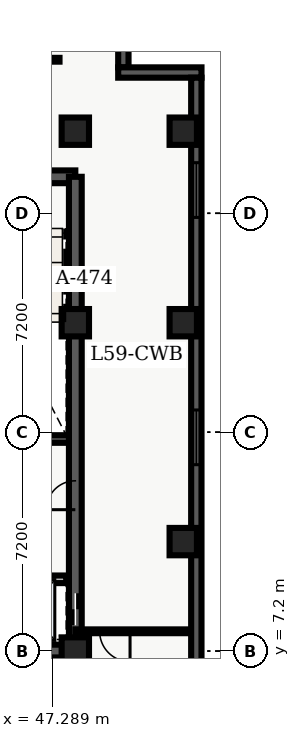
"""IFC4 building model, lengths in metres.
Left out: names, types, materials, properties, quantities, classifications, styles, units other than length and angle.
Written with IfcOpenShell. Run it as: python <this file> out.ifc"""

import sys

from ifc_helpers import new_model, entity, si_unit, converted_unit, direction, frame, origin_with_axes, origin_2d_with_axis, place, context, subcontext, project, spatial, polyline, rectangle, outline, extrude, element, fill, save


model = new_model("IFC4")
c1 = context("Model", 3, precision=1e-05, world=origin_with_axes(), true_north=direction((0.0, 1.0)))
c2 = subcontext(c1, "Body", "Model", "MODEL_VIEW")
j1 = project(units=[si_unit("LENGTHUNIT", "METRE"), converted_unit("PLANEANGLEUNIT", "DEGREE", entity("IfcPlaneAngleMeasure", 0.017), si_unit("PLANEANGLEUNIT", "RADIAN"), dimensions=[0, 0, 0, 0, 0, 0, 0])], contexts=[c1])
p1 = place(None, origin_with_axes())
s1 = spatial("IfcSite", under=j1, at=p1, CompositionType="ELEMENT")
p2 = place(p1, origin_with_axes())
s2 = spatial("IfcBuilding", under=s1, at=p2, CompositionType="ELEMENT")
p3 = place(p2, frame((0.0, 0.0, 240.3), z_axis=(0.0, 0.0, 1.0), x_axis=(1.0, 0.0, 0.0)))
s3 = spatial("IfcBuildingStorey", under=s2, at=p3, CompositionType="ELEMENT", Elevation=240.3)
p4 = place(p3, frame((40.2, 7.2, 0.0), z_axis=(0.0, 0.0, 1.0), x_axis=(1.0, 0.0, 0.0)))
e1 = element("IfcWall", 1, at=p4, inside=s3, PredefinedType="SHEAR", context=c2, shape_type="SweptSolid", body=[
    extrude(outline(polyline([(0.0, -0.21), (7.85, -0.21), (7.85, 0.21), (0.0, 0.21), (0.0, -0.21)])), origin_with_axes(), (0.0, 0.0, 1.0), 3.66),
])
p5 = place(p4, frame((2.175, 0.0, 0.0), z_axis=(0.0, 0.0, 1.0), x_axis=(1.0, 0.0, 0.0)))
e2 = element("IfcOpeningElement", 2, at=p5, cuts=e1, PredefinedType="OPENING", context=c2, shape_type="SweptSolid", body=[
    extrude(rectangle(XDim=1.05, YDim=0.44, at=origin_2d_with_axis()), origin_with_axes(), (0.0, 0.0, 1.0), 2.15),
])
p6 = place(p3, frame((40.2, 22.8, 0.0), z_axis=(0.0, 0.0, 1.0), x_axis=(1.0, 0.0, 0.0)))
e3 = element("IfcWall", 3, at=p6, inside=s3, PredefinedType="SHEAR", context=c2, shape_type="SweptSolid", body=[
    extrude(outline(polyline([(0.0, -0.21), (7.85, -0.21), (7.85, 0.21), (0.0, 0.21), (0.0, -0.21)])), origin_with_axes(), (0.0, 0.0, 1.0), 3.66),
])
p7 = place(p6, frame((5.775, 0.0, 0.0), z_axis=(0.0, 0.0, 1.0), x_axis=(1.0, 0.0, 0.0)))
e4 = element("IfcOpeningElement", 4, at=p7, cuts=e3, PredefinedType="OPENING", context=c2, shape_type="SweptSolid", body=[
    extrude(rectangle(XDim=1.05, YDim=0.44, at=origin_2d_with_axis()), origin_with_axes(), (0.0, 0.0, 1.0), 2.15),
])
p8 = place(p6, frame((2.15, 0.0, 0.0), z_axis=(0.0, 0.0, 1.0), x_axis=(1.0, 0.0, 0.0)))
e5 = element("IfcOpeningElement", 5, at=p8, cuts=e3, PredefinedType="OPENING", context=c2, shape_type="SweptSolid", body=[
    extrude(rectangle(XDim=0.9, YDim=0.44, at=origin_2d_with_axis()), origin_with_axes(), (0.0, 0.0, 1.0), 2.15),
])
p9 = place(p3, frame((48.05, 7.2, 0.0), z_axis=(0.0, 0.0, 1.0), x_axis=(0.0, 1.0, 0.0)))
e6 = element("IfcWall", 6, at=p9, inside=s3, PredefinedType="SHEAR", context=c2, shape_type="SweptSolid", body=[
    extrude(outline(polyline([(0.0, -0.21), (15.6, -0.21), (15.6, 0.21), (0.0, 0.21), (0.0, -0.21)])), origin_with_axes(), (0.0, 0.0, 1.0), 3.66),
])
p10 = place(p9, frame((1.375, 0.0, 0.0), z_axis=(0.0, 0.0, 1.0), x_axis=(1.0, 0.0, 0.0)))
e7 = element("IfcOpeningElement", 7, at=p10, cuts=e6, PredefinedType="OPENING", context=c2, shape_type="SweptSolid", body=[
    extrude(rectangle(XDim=1.05, YDim=0.44, at=origin_2d_with_axis()), origin_with_axes(), (0.0, 0.0, 1.0), 2.15),
])
p11 = place(p9, frame((5.125, 0.0, 0.0), z_axis=(0.0, 0.0, 1.0), x_axis=(1.0, 0.0, 0.0)))
e8 = element("IfcOpeningElement", 8, at=p11, cuts=e6, PredefinedType="OPENING", context=c2, shape_type="SweptSolid", body=[
    extrude(rectangle(XDim=0.95, YDim=0.44, at=origin_2d_with_axis()), origin_with_axes(), (0.0, 0.0, 1.0), 2.15),
])
p12 = place(p3, frame((44.25, 14.175, 0.0), z_axis=(0.0, 0.0, 1.0), x_axis=(1.0, 0.0, 0.0)))
e9 = element("IfcWall", 9, at=p12, inside=s3, PredefinedType="SHEAR", context=c2, shape_type="SweptSolid", body=[
    extrude(outline(polyline([(0.0, -0.125), (3.59, -0.125), (3.59, 0.125), (0.0, 0.125), (0.0, -0.125)])), origin_with_axes(), (0.0, 0.0, 1.0), 3.66),
])
for number, where, z_axis, x_axis in (
    (10, (48.05, 7.2, 0.0), (0.0, 0.0, 1.0), (1.0, 0.0, 0.0)),
    (11, (48.05, 18.0, 0.0), (0.0, 0.0, 1.0), (1.0, 0.0, 0.0)),
    (12, (48.05, 24.3, 0.0), (0.0, 0.0, 1.0), (1.0, 0.0, 0.0)),
    (13, (51.6, 10.8, 0.0), (0.0, 0.0, 1.0), (1.0, 0.0, 0.0)),
    (14, (51.6, 18.0, 0.0), (0.0, 0.0, 1.0), (1.0, 0.0, 0.0)),
    (15, (51.6, 24.3, 0.0), (0.0, 0.0, 1.0), (1.0, 0.0, 0.0)),
):
    element("IfcColumn", number, at=place(p3, frame(where, z_axis=z_axis, x_axis=x_axis)), inside=s3, PredefinedType="COLUMN", context=c2, shape_type="SweptSolid", body=[
        extrude(rectangle(XDim=0.9, YDim=0.9, at=origin_2d_with_axis()), origin_with_axes(), (0.0, 0.0, 1.0), 3.9),
    ])
p13 = place(p3, frame((44.25, 9.56, 0.0), z_axis=(0.0, 0.0, 1.0), x_axis=(1.0, 0.0, 0.0)))
e16 = element("IfcWall", 16, at=p13, inside=s3, PredefinedType="SOLIDWALL", context=c2, shape_type="SweptSolid", body=[
    extrude(outline(polyline([(0.0, -0.125), (3.5, -0.125), (3.5, 0.125), (0.0, 0.125), (0.0, -0.125)])), origin_with_axes(), (0.0, 0.0, 1.0), 2.7),
])
p14 = place(p3, frame((51.865, 7.85, 0.0), z_axis=(0.0, 0.0, 1.0), x_axis=(-1.0, 0.0, 0.0)))
e17 = element("IfcWall", 17, at=p14, inside=s3, PredefinedType="PARTITIONING", context=c2, shape_type="SweptSolid", body=[
    extrude(outline(polyline([(0.0, -0.062), (3.815, -0.062), (3.815, 0.062), (0.0, 0.062), (0.0, -0.062)])), origin_with_axes(), (0.0, 0.0, 1.0), 2.7),
])
p15 = place(p14, frame((2.515, 0.0, 0.0), z_axis=(0.0, 0.0, 1.0), x_axis=(1.0, 0.0, 0.0)))
e18 = element("IfcOpeningElement", 18, at=p15, cuts=e17, PredefinedType="OPENING", context=c2, shape_type="SweptSolid", body=[
    extrude(rectangle(XDim=1.0, YDim=0.145, at=origin_2d_with_axis()), origin_with_axes(), (0.0, 0.0, 1.0), 2.15),
])
p16 = place(p3, frame((36.335, 26.65, 0.0), z_axis=(0.0, 0.0, 1.0), x_axis=(1.0, 0.0, 0.0)))
e19 = element("IfcWall", 19, at=p16, inside=s3, PredefinedType="PARTITIONING", context=c2, shape_type="SweptSolid", body=[
    extrude(outline(polyline([(0.0, -0.062), (11.195, -0.062), (11.195, 0.062), (0.0, 0.062), (0.0, -0.062)])), origin_with_axes(), (0.0, 0.0, 1.0), 2.7),
])
p17 = place(p16, frame((6.665, 0.0, 0.0), z_axis=(0.0, 0.0, 1.0), x_axis=(1.0, 0.0, 0.0)))
e20 = element("IfcOpeningElement", 20, at=p17, cuts=e19, PredefinedType="OPENING", context=c2, shape_type="SweptSolid", body=[
    extrude(rectangle(XDim=1.0, YDim=0.145, at=origin_2d_with_axis()), origin_with_axes(), (0.0, 0.0, 1.0), 2.15),
])
p18 = place(p3, frame((49.63, 28.46, 0.0), z_axis=(0.0, 0.0, 1.0), x_axis=(0.0, -1.0, 0.0)))
e21 = element("IfcWall", 21, at=p18, inside=s3, PredefinedType="SOLIDWALL", context=c2, shape_type="SweptSolid", body=[
    extrude(outline(polyline([(0.0, -0.17), (2.06, -0.17), (2.06, 0.17), (0.0, 0.17), (0.0, -0.17)])), origin_with_axes(), (0.0, 0.0, 1.0), 3.66),
])
p19 = place(p3, frame((49.46, 26.23, 0.0), z_axis=(0.0, 0.0, 1.0), x_axis=(1.0, 0.0, 0.0)))
e22 = element("IfcWall", 22, at=p19, inside=s3, PredefinedType="SOLIDWALL", context=c2, shape_type="SweptSolid", body=[
    extrude(outline(polyline([(0.0, -0.17), (2.74, -0.17), (2.74, 0.17), (0.0, 0.17), (0.0, -0.17)])), origin_with_axes(), (0.0, 0.0, 1.0), 3.66),
])
p20 = place(p3, frame((52.03, 26.06, 0.0), z_axis=(0.0, 0.0, 1.0), x_axis=(0.0, -1.0, 0.0)))
e23 = element("IfcWall", 23, at=p20, inside=s3, PredefinedType="SOLIDWALL", context=c2, shape_type="SweptSolid", body=[
    extrude(outline(polyline([(0.0, -0.17), (23.66, -0.17), (23.66, 0.17), (0.0, 0.17), (0.0, -0.17)])), origin_with_axes(), (0.0, 0.0, 1.0), 3.66),
])
p21 = place(p20, frame((3.696, 0.0, 0.45), z_axis=(0.0, 0.0, 1.0), x_axis=(1.0, 0.0, 0.0)))
e24 = element("IfcOpeningElement", 24, at=p21, cuts=e23, PredefinedType="OPENING", context=c2, shape_type="SweptSolid", body=[
    extrude(rectangle(XDim=1.8, YDim=0.36, at=origin_2d_with_axis()), origin_with_axes(), (0.0, 0.0, 1.0), 2.1),
])
p22 = place(p20, frame((11.83, 0.0, 0.45), z_axis=(0.0, 0.0, 1.0), x_axis=(1.0, 0.0, 0.0)))
e25 = element("IfcOpeningElement", 25, at=p22, cuts=e23, PredefinedType="OPENING", context=c2, shape_type="SweptSolid", body=[
    extrude(rectangle(XDim=1.8, YDim=0.36, at=origin_2d_with_axis()), origin_with_axes(), (0.0, 0.0, 1.0), 2.1),
])
p23 = place(p20, frame((20.364, 0.0, 0.45), z_axis=(0.0, 0.0, 1.0), x_axis=(1.0, 0.0, 0.0)))
e26 = element("IfcOpeningElement", 26, at=p23, cuts=e23, PredefinedType="OPENING", context=c2, shape_type="SweptSolid", body=[
    extrude(rectangle(XDim=1.8, YDim=0.36, at=origin_2d_with_axis()), origin_with_axes(), (0.0, 0.0, 1.0), 2.1),
])
p24 = place(p9, frame((1.375, 0.0, 0.0), z_axis=(0.0, 0.0, 1.0), x_axis=(1.0, 0.0, 0.0)))
e27 = element("IfcDoor", 27, at=p24, inside=s3, OperationType="SLIDING_TO_LEFT", PredefinedType="DOOR", context=c2, shape_type="SweptSolid", body=[
    extrude(rectangle(XDim=1.05, YDim=0.09, at=origin_2d_with_axis()), origin_with_axes(), (0.0, 0.0, 1.0), 2.15),
])
fill(e7, e27)
p25 = place(p9, frame((5.125, 0.0, 0.0), z_axis=(0.0, 0.0, 1.0), x_axis=(1.0, 0.0, 0.0)))
e28 = element("IfcDoor", 28, at=p25, inside=s3, OperationType="SINGLE_SWING_LEFT", PredefinedType="DOOR", context=c2, shape_type="SweptSolid", body=[
    extrude(rectangle(XDim=0.95, YDim=0.09, at=origin_2d_with_axis()), origin_with_axes(), (0.0, 0.0, 1.0), 2.15),
])
fill(e8, e28)
p26 = place(p14, frame((2.515, 0.0, 0.0), z_axis=(0.0, 0.0, 1.0), x_axis=(1.0, 0.0, 0.0)))
e29 = element("IfcDoor", 29, at=p26, inside=s3, OperationType="SINGLE_SWING_LEFT", PredefinedType="DOOR", context=c2, shape_type="SweptSolid", body=[
    extrude(rectangle(XDim=1.0, YDim=0.075, at=origin_2d_with_axis()), origin_with_axes(), (0.0, 0.0, 1.0), 2.15),
])
fill(e18, e29)
p27 = place(p20, frame((3.696, 0.0, 0.45), z_axis=(0.0, 0.0, 1.0), x_axis=(1.0, 0.0, 0.0)))
e30 = element("IfcWindow", 30, at=p27, inside=s3, PredefinedType="WINDOW", context=c2, shape_type="SweptSolid", body=[
    extrude(rectangle(XDim=1.8, YDim=0.09, at=origin_2d_with_axis()), origin_with_axes(), (0.0, 0.0, 1.0), 2.1),
])
fill(e24, e30)
p28 = place(p20, frame((11.83, 0.0, 0.45), z_axis=(0.0, 0.0, 1.0), x_axis=(1.0, 0.0, 0.0)))
e31 = element("IfcWindow", 31, at=p28, inside=s3, PredefinedType="WINDOW", context=c2, shape_type="SweptSolid", body=[
    extrude(rectangle(XDim=1.8, YDim=0.09, at=origin_2d_with_axis()), origin_with_axes(), (0.0, 0.0, 1.0), 2.1),
])
fill(e25, e31)
save(model, sys.argv[1])
